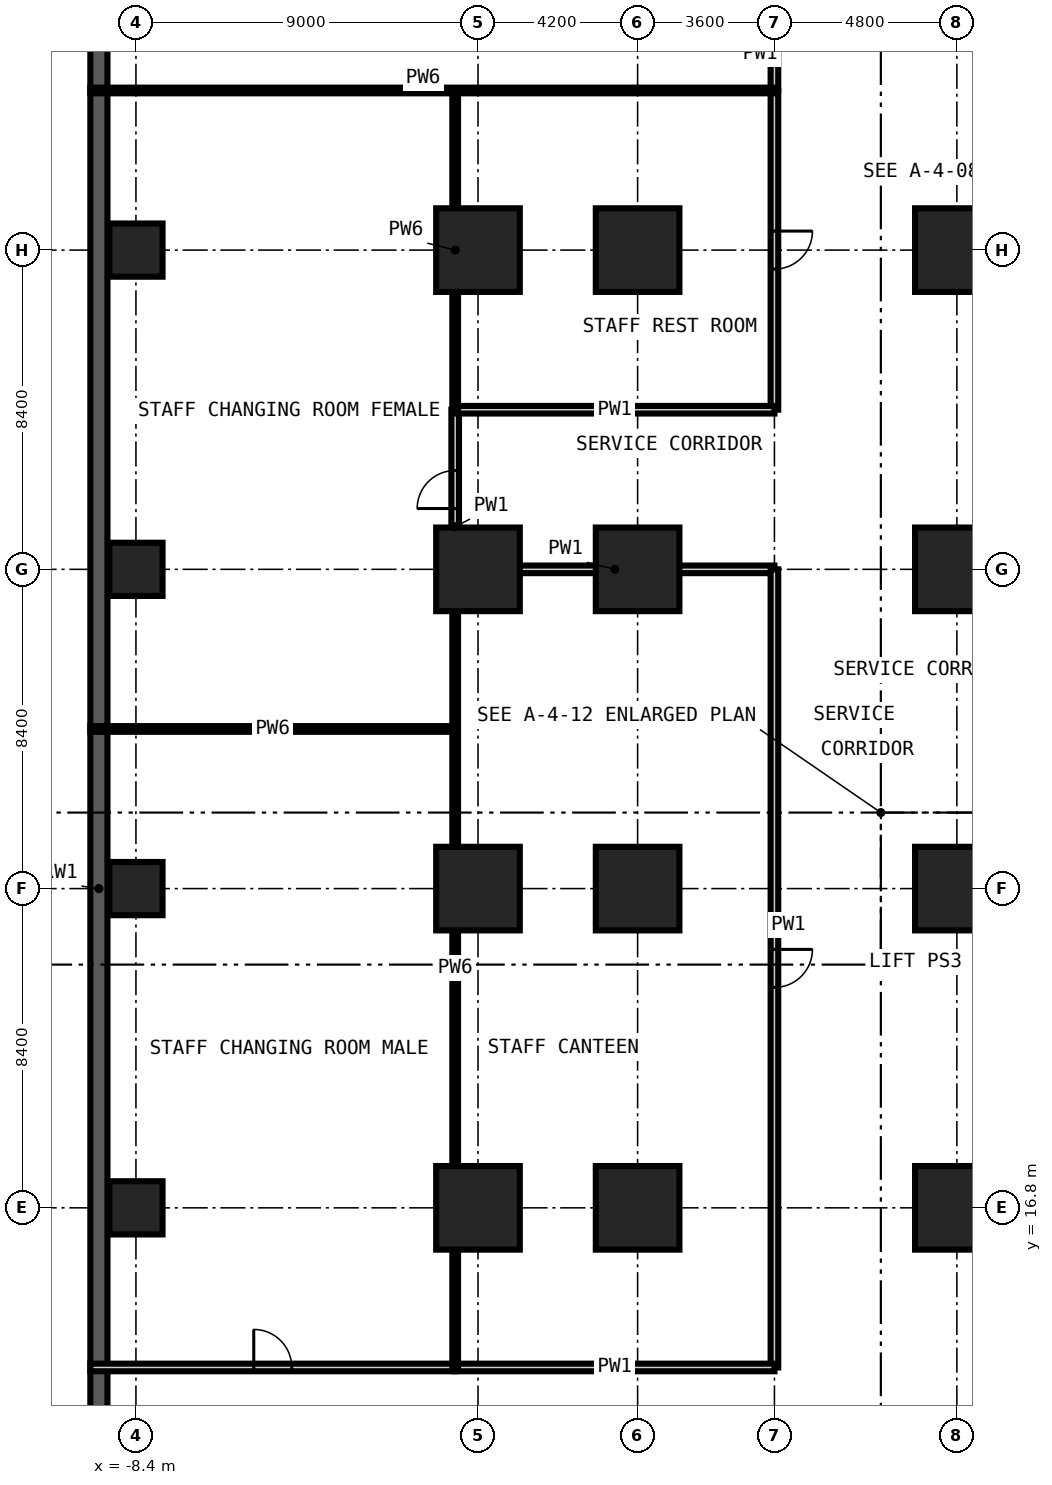
"""IFC4 building model, lengths in metres.
Left out: names, types, materials, properties, quantities, classifications, styles, units other than length and angle.
Written with IfcOpenShell. Run it as: python <this file> out.ifc"""

import sys

from ifc_helpers import new_model, si_unit, direction, frame, frame_2d, origin, origin_2d, place, context, subcontext, project, spatial, rectangle, extrude, element, fill, save


model = new_model("IFC4")
c1 = context("Model", 3, precision=1e-05, world=origin(), true_north=direction((0.0, 1.0)))
c2 = subcontext(c1, "Body", "Model", "MODEL_VIEW")
j1 = project(units=[si_unit("LENGTHUNIT", "METRE"), si_unit("PLANEANGLEUNIT", "RADIAN")], contexts=[c1])
p1 = place(None, origin())
s1 = spatial("IfcSite", under=j1, at=p1, CompositionType="ELEMENT")
p2 = place(p1, origin())
s2 = spatial("IfcBuilding", under=s1, at=p2, CompositionType="ELEMENT")
p3 = place(p2, frame((0.0, 0.0, -5.4)))
s3 = spatial("IfcBuildingStorey", under=s2, at=p3, CompositionType="ELEMENT", Elevation=-5.4)
for number, where, z_axis, x_axis in (
    (1, (0.6, 16.8, 0.0), (0.0, 0.0, 1.0), (1.0, 0.0, 0.0)),
    (2, (0.6, 25.2, 0.0), (0.0, 0.0, 1.0), (1.0, 0.0, 0.0)),
    (3, (0.6, 33.6, 0.0), (0.0, 0.0, 1.0), (1.0, 0.0, 0.0)),
    (4, (0.6, 42.0, 0.0), (0.0, 0.0, 1.0), (1.0, 0.0, 0.0)),
    (5, (4.8, 16.8, 0.0), (0.0, 0.0, 1.0), (1.0, 0.0, 0.0)),
    (6, (4.8, 25.2, 0.0), (0.0, 0.0, 1.0), (1.0, 0.0, 0.0)),
    (7, (4.8, 33.6, 0.0), (0.0, 0.0, 1.0), (1.0, 0.0, 0.0)),
    (8, (4.8, 42.0, 0.0), (0.0, 0.0, 1.0), (1.0, 0.0, 0.0)),
    (9, (13.2, 16.8, 0.0), (0.0, 0.0, 1.0), (1.0, 0.0, 0.0)),
    (10, (13.2, 25.2, 0.0), (0.0, 0.0, 1.0), (1.0, 0.0, 0.0)),
    (11, (13.2, 33.6, 0.0), (0.0, 0.0, 1.0), (1.0, 0.0, 0.0)),
    (12, (13.2, 42.0, 0.0), (0.0, 0.0, 1.0), (1.0, 0.0, 0.0)),
):
    element("IfcColumn", number, at=place(p3, frame(where, z_axis=z_axis, x_axis=x_axis)), inside=s3, PredefinedType="COLUMN", context=c2, shape_type="SweptSolid", body=[
        extrude(rectangle(XDim=2.2, YDim=2.2, at=origin_2d()), origin(), (0.0, 0.0, 1.0), 5.1),
    ])
for number, where, z_axis, x_axis in (
    (13, (-8.4, 16.8, -0.3), (0.0, 0.0, 1.0), (1.0, 0.0, 0.0)),
    (14, (-8.4, 25.2, -0.3), (0.0, 0.0, 1.0), (1.0, 0.0, 0.0)),
    (15, (-8.4, 33.6, -0.3), (0.0, 0.0, 1.0), (1.0, 0.0, 0.0)),
    (16, (-8.4, 42.0, -0.3), (0.0, 0.0, 1.0), (1.0, 0.0, 0.0)),
):
    element("IfcColumn", number, at=place(p3, frame(where, z_axis=z_axis, x_axis=x_axis)), inside=s3, PredefinedType="COLUMN", context=c2, shape_type="SweptSolid", body=[
        extrude(rectangle(XDim=1.4, YDim=1.4, at=origin_2d()), origin(), (0.0, 0.0, 1.0), 5.4),
    ])
p4 = place(p3, frame((-9.375, 58.8, 0.0), z_axis=(0.0, 0.0, 1.0), x_axis=(0.0, -1.0, 0.0)))
e17 = element("IfcWall", 17, at=p4, inside=s3, PredefinedType="SOLIDWALL", context=c2, shape_type="SweptSolid", body=[
    extrude(rectangle(XDim=67.2, YDim=0.45, at=frame_2d((33.6, 0.0))), origin(), (0.0, 0.0, 1.0), 5.1),
])
p5 = place(p3, frame((0.0, 33.6, 0.0), z_axis=(0.0, 0.0, 1.0), x_axis=(0.0, 1.0, 0.0)))
e18 = element("IfcWall", 18, at=p5, inside=s3, PredefinedType="PARTITIONING", context=c2, shape_type="SweptSolid", body=[
    extrude(rectangle(XDim=4.2, YDim=0.2, at=frame_2d((2.1, 0.0))), origin(), (0.0, 0.0, 1.0), 5.1),
])
p6 = place(p5, frame((1.6, 0.0, 0.0)))
e19 = element("IfcOpeningElement", 19, at=p6, cuts=e18, PredefinedType="OPENING", context=c2, shape_type="SweptSolid", body=[
    extrude(rectangle(XDim=1.0, YDim=2.1, at=frame_2d((0.5, 1.05))), frame((0.0, 0.11, 0.0), z_axis=(0.0, -1.0, 0.0), x_axis=(1.0, 0.0, 0.0)), (0.0, 0.0, 1.0), 0.22),
])
p7 = place(p3, frame((8.4, 46.2, 0.0), z_axis=(0.0, 0.0, 1.0), x_axis=(0.0, 1.0, 0.0)))
e20 = element("IfcWall", 20, at=p7, inside=s3, PredefinedType="PARTITIONING", context=c2, shape_type="SweptSolid", body=[
    extrude(rectangle(XDim=4.2, YDim=0.2, at=frame_2d((2.1, 0.0))), origin(), (0.0, 0.0, 1.0), 5.1),
])
p8 = place(p7, frame((1.6, 0.0, 0.0)))
e21 = element("IfcOpeningElement", 21, at=p8, cuts=e20, PredefinedType="OPENING", context=c2, shape_type="SweptSolid", body=[
    extrude(rectangle(XDim=1.0, YDim=2.1, at=frame_2d((0.5, 1.05))), frame((0.0, 0.11, 0.0), z_axis=(0.0, -1.0, 0.0), x_axis=(1.0, 0.0, 0.0)), (0.0, 0.0, 1.0), 0.22),
])
p9 = place(p3, frame((-9.6, 12.6, 0.0), z_axis=(0.0, 0.0, 1.0), x_axis=(1.0, 0.0, 0.0)))
e22 = element("IfcWall", 22, at=p9, inside=s3, PredefinedType="PARTITIONING", context=c2, shape_type="SweptSolid", body=[
    extrude(rectangle(XDim=9.6, YDim=0.2, at=frame_2d((4.8, 0.0))), origin(), (0.0, 0.0, 1.0), 5.1),
])
p10 = place(p9, frame((4.3, 0.0, 0.0)))
e23 = element("IfcOpeningElement", 23, at=p10, cuts=e22, PredefinedType="OPENING", context=c2, shape_type="SweptSolid", body=[
    extrude(rectangle(XDim=1.0, YDim=2.1, at=frame_2d((0.5, 1.05))), frame((0.0, 0.11, 0.0), z_axis=(0.0, -1.0, 0.0), x_axis=(1.0, 0.0, 0.0)), (0.0, 0.0, 1.0), 0.22),
])
p11 = place(p3, frame((0.0, 33.6, 0.0), z_axis=(0.0, 0.0, 1.0), x_axis=(1.0, 0.0, 0.0)))
e24 = element("IfcWall", 24, at=p11, inside=s3, PredefinedType="PARTITIONING", context=c2, shape_type="SweptSolid", body=[
    extrude(rectangle(XDim=8.4, YDim=0.2, at=frame_2d((4.2, 0.0))), origin(), (0.0, 0.0, 1.0), 5.1),
])
p12 = place(p3, frame((8.4, 33.6, 0.0), z_axis=(0.0, 0.0, 1.0), x_axis=(0.0, -1.0, 0.0)))
e25 = element("IfcWall", 25, at=p12, inside=s3, PredefinedType="PARTITIONING", context=c2, shape_type="SweptSolid", body=[
    extrude(rectangle(XDim=21.0, YDim=0.2, at=frame_2d((10.5, 0.0))), origin(), (0.0, 0.0, 1.0), 5.1),
])
p13 = place(p12, frame((10.0, 0.0, 0.0)))
e26 = element("IfcOpeningElement", 26, at=p13, cuts=e25, PredefinedType="OPENING", context=c2, shape_type="SweptSolid", body=[
    extrude(rectangle(XDim=1.0, YDim=2.1, at=frame_2d((0.5, 1.05))), frame((0.0, 0.11, 0.0), z_axis=(0.0, -1.0, 0.0), x_axis=(1.0, 0.0, 0.0)), (0.0, 0.0, 1.0), 0.22),
])
p14 = place(p3, frame((8.4, 46.2, 0.0), z_axis=(0.0, 0.0, 1.0), x_axis=(0.0, -1.0, 0.0)))
e27 = element("IfcWall", 27, at=p14, inside=s3, PredefinedType="PARTITIONING", context=c2, shape_type="SweptSolid", body=[
    extrude(rectangle(XDim=8.4, YDim=0.2, at=frame_2d((4.2, 0.0))), origin(), (0.0, 0.0, 1.0), 5.1),
])
p15 = place(p14, frame((3.7, 0.0, 0.0)))
e28 = element("IfcOpeningElement", 28, at=p15, cuts=e27, PredefinedType="OPENING", context=c2, shape_type="SweptSolid", body=[
    extrude(rectangle(XDim=1.0, YDim=2.1, at=frame_2d((0.5, 1.05))), frame((0.0, 0.11, 0.0), z_axis=(0.0, -1.0, 0.0), x_axis=(1.0, 0.0, 0.0)), (0.0, 0.0, 1.0), 0.22),
])
for number, where, z_axis, x_axis in (
    (29, (8.4, 12.6, 0.0), (0.0, 0.0, 1.0), (-1.0, 0.0, 0.0)),
    (30, (8.4, 37.8, 0.0), (0.0, 0.0, 1.0), (-1.0, 0.0, 0.0)),
):
    element("IfcWall", number, at=place(p3, frame(where, z_axis=z_axis, x_axis=x_axis)), inside=s3, PredefinedType="PARTITIONING", context=c2, shape_type="SweptSolid", body=[
        extrude(rectangle(XDim=8.4, YDim=0.2, at=frame_2d((4.2, 0.0))), origin(), (0.0, 0.0, 1.0), 5.1),
    ])
p16 = place(p3, frame((0.0, 12.6, 0.0), z_axis=(0.0, 0.0, 1.0), x_axis=(0.0, 1.0, 0.0)))
e31 = element("IfcWall", 31, at=p16, inside=s3, PredefinedType="PARTITIONING", context=c2, shape_type="SweptSolid", body=[
    extrude(rectangle(XDim=21.0, YDim=0.15, at=frame_2d((10.5, 0.0))), origin(), (0.0, 0.0, 1.0), 5.1),
])
p17 = place(p3, frame((0.0, 37.8, 0.0), z_axis=(0.0, 0.0, 1.0), x_axis=(0.0, 1.0, 0.0)))
e32 = element("IfcWall", 32, at=p17, inside=s3, PredefinedType="PARTITIONING", context=c2, shape_type="SweptSolid", body=[
    extrude(rectangle(XDim=8.4, YDim=0.15, at=frame_2d((4.2, 0.0))), origin(), (0.0, 0.0, 1.0), 5.1),
])
p18 = place(p3, frame((-9.6, 29.4, 0.0), z_axis=(0.0, 0.0, 1.0), x_axis=(1.0, 0.0, 0.0)))
e33 = element("IfcWall", 33, at=p18, inside=s3, PredefinedType="PARTITIONING", context=c2, shape_type="SweptSolid", body=[
    extrude(rectangle(XDim=9.6, YDim=0.15, at=frame_2d((4.8, 0.0))), origin(), (0.0, 0.0, 1.0), 5.1),
])
p19 = place(p3, frame((-9.6, 46.2, 0.0), z_axis=(0.0, 0.0, 1.0), x_axis=(1.0, 0.0, 0.0)))
e34 = element("IfcWall", 34, at=p19, inside=s3, PredefinedType="PARTITIONING", context=c2, shape_type="SweptSolid", body=[
    extrude(rectangle(XDim=18.0, YDim=0.15, at=frame_2d((9.0, 0.0))), origin(), (0.0, 0.0, 1.0), 5.1),
])
p20 = place(p10, origin())
e35 = element("IfcDoor", 35, at=p20, inside=s3, OperationType="SINGLE_SWING_LEFT", PredefinedType="DOOR", context=c2, shape_type="SweptSolid", body=[
    extrude(rectangle(XDim=1.0, YDim=2.1, at=frame_2d((0.5, 1.05))), frame((0.0, 0.025, 0.0), z_axis=(0.0, -1.0, 0.0), x_axis=(1.0, 0.0, 0.0)), (0.0, 0.0, 1.0), 0.05),
])
fill(e23, e35)
p21 = place(p6, origin())
e36 = element("IfcDoor", 36, at=p21, inside=s3, OperationType="SINGLE_SWING_LEFT", PredefinedType="DOOR", context=c2, shape_type="SweptSolid", body=[
    extrude(rectangle(XDim=1.0, YDim=2.1, at=frame_2d((0.5, 1.05))), frame((0.0, 0.025, 0.0), z_axis=(0.0, -1.0, 0.0), x_axis=(1.0, 0.0, 0.0)), (0.0, 0.0, 1.0), 0.05),
])
fill(e19, e36)
p22 = place(p13, origin())
e37 = element("IfcDoor", 37, at=p22, inside=s3, OperationType="SINGLE_SWING_LEFT", PredefinedType="DOOR", context=c2, shape_type="SweptSolid", body=[
    extrude(rectangle(XDim=1.0, YDim=2.1, at=frame_2d((0.5, 1.05))), frame((0.0, 0.025, 0.0), z_axis=(0.0, -1.0, 0.0), x_axis=(1.0, 0.0, 0.0)), (0.0, 0.0, 1.0), 0.05),
])
fill(e26, e37)
p23 = place(p15, origin())
e38 = element("IfcDoor", 38, at=p23, inside=s3, OperationType="SINGLE_SWING_LEFT", PredefinedType="DOOR", context=c2, shape_type="SweptSolid", body=[
    extrude(rectangle(XDim=1.0, YDim=2.1, at=frame_2d((0.5, 1.05))), frame((0.0, 0.025, 0.0), z_axis=(0.0, -1.0, 0.0), x_axis=(1.0, 0.0, 0.0)), (0.0, 0.0, 1.0), 0.05),
])
fill(e28, e38)
save(model, sys.argv[1])
